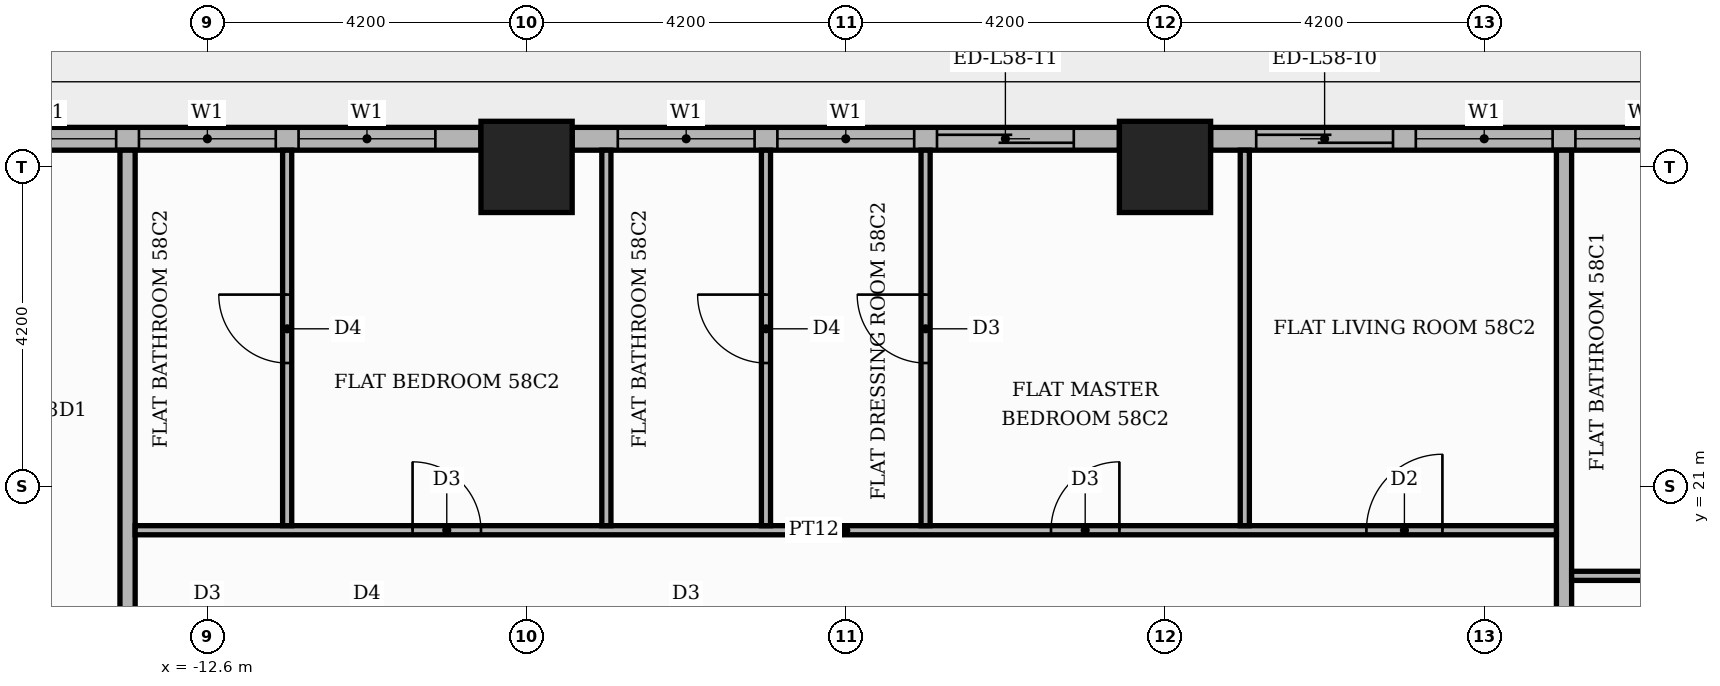
"""IFC4 building model, lengths in metres.
Left out: names, types, materials, properties, quantities, classifications, styles, units other than length and angle.
Written with IfcOpenShell. Run it as: python <this file> out.ifc"""

import sys

from ifc_helpers import new_model, si_unit, direction, frame, frame_2d, origin, origin_2d, place, context, subcontext, project, spatial, rectangle, extrude, element, fill, save


model = new_model("IFC4")
c1 = context("Model", 3, precision=1e-05, world=origin(), true_north=direction((0.0, 1.0)))
c2 = subcontext(c1, "Body", "Model", "MODEL_VIEW")
j1 = project(units=[si_unit("LENGTHUNIT", "METRE"), si_unit("PLANEANGLEUNIT", "RADIAN")], contexts=[c1])
p1 = place(None, origin())
s1 = spatial("IfcSite", under=j1, at=p1, CompositionType="ELEMENT")
p2 = place(p1, origin())
s2 = spatial("IfcBuilding", under=s1, at=p2, CompositionType="ELEMENT")
p3 = place(p2, frame((0.0, 0.0, 244.5)))
s3 = spatial("IfcBuildingStorey", under=s2, at=p3, CompositionType="ELEMENT", Elevation=244.5)
for number, where, z_axis, x_axis in (
    (1, (0.0, 25.2, 0.0), (0.0, 0.0, 1.0), (1.0, 0.0, 0.0)),
    (2, (-8.4, 25.2, 0.0), (0.0, 0.0, 1.0), (1.0, 0.0, 0.0)),
):
    element("IfcColumn", number, at=place(p3, frame(where, z_axis=z_axis, x_axis=x_axis)), inside=s3, PredefinedType="COLUMN", context=c2, shape_type="SweptSolid", body=[
        extrude(rectangle(XDim=1.2, YDim=1.2, at=origin_2d()), origin(), (0.0, 0.0, 1.0), 3.9),
    ])
p4 = place(p3, frame((7.8, 25.57, 0.0), z_axis=(0.0, 0.0, 1.0), x_axis=(-1.0, 0.0, 0.0)))
e3 = element("IfcWall", 3, at=p4, inside=s3, PredefinedType="STANDARD", context=c2, shape_type="SweptSolid", body=[
    extrude(rectangle(XDim=7.2, YDim=0.3, at=frame_2d((3.6, 0.0))), origin(), (0.0, 0.0, 1.0), 3.48),
])
p5 = place(p4, frame((0.6, 0.0, 0.9)))
e4 = element("IfcOpeningElement", 4, at=p5, cuts=e3, PredefinedType="OPENING", context=c2, shape_type="SweptSolid", body=[
    extrude(rectangle(XDim=1.8, YDim=2.1, at=frame_2d((0.9, 1.05))), frame((0.0, 0.16, 0.0), z_axis=(0.0, -1.0, 0.0), x_axis=(1.0, 0.0, 0.0)), (0.0, 0.0, 1.0), 0.32),
])
p6 = place(p4, frame((2.7, 0.0, 0.9)))
e5 = element("IfcOpeningElement", 5, at=p6, cuts=e3, PredefinedType="OPENING", context=c2, shape_type="SweptSolid", body=[
    extrude(rectangle(XDim=1.8, YDim=2.1, at=frame_2d((0.9, 1.05))), frame((0.0, 0.16, 0.0), z_axis=(0.0, -1.0, 0.0), x_axis=(1.0, 0.0, 0.0)), (0.0, 0.0, 1.0), 0.32),
])
p7 = place(p4, frame((4.8, 0.0, 0.0)))
e6 = element("IfcOpeningElement", 6, at=p7, cuts=e3, PredefinedType="OPENING", context=c2, shape_type="SweptSolid", body=[
    extrude(rectangle(XDim=1.8, YDim=2.4, at=frame_2d((0.9, 1.2))), frame((0.0, 0.16, 0.0), z_axis=(0.0, -1.0, 0.0), x_axis=(1.0, 0.0, 0.0)), (0.0, 0.0, 1.0), 0.32),
])
p8 = place(p3, frame((-0.6, 25.57, 0.0), z_axis=(0.0, 0.0, 1.0), x_axis=(-1.0, 0.0, 0.0)))
e7 = element("IfcWall", 7, at=p8, inside=s3, PredefinedType="STANDARD", context=c2, shape_type="SweptSolid", body=[
    extrude(rectangle(XDim=7.2, YDim=0.3, at=frame_2d((3.6, 0.0))), origin(), (0.0, 0.0, 1.0), 3.48),
])
p9 = place(p8, frame((0.6, 0.0, 0.0)))
e8 = element("IfcOpeningElement", 8, at=p9, cuts=e7, PredefinedType="OPENING", context=c2, shape_type="SweptSolid", body=[
    extrude(rectangle(XDim=1.8, YDim=2.4, at=frame_2d((0.9, 1.2))), frame((0.0, 0.16, 0.0), z_axis=(0.0, -1.0, 0.0), x_axis=(1.0, 0.0, 0.0)), (0.0, 0.0, 1.0), 0.32),
])
p10 = place(p8, frame((2.7, 0.0, 0.9)))
e9 = element("IfcOpeningElement", 9, at=p10, cuts=e7, PredefinedType="OPENING", context=c2, shape_type="SweptSolid", body=[
    extrude(rectangle(XDim=1.8, YDim=2.1, at=frame_2d((0.9, 1.05))), frame((0.0, 0.16, 0.0), z_axis=(0.0, -1.0, 0.0), x_axis=(1.0, 0.0, 0.0)), (0.0, 0.0, 1.0), 0.32),
])
p11 = place(p8, frame((4.8, 0.0, 0.9)))
e10 = element("IfcOpeningElement", 10, at=p11, cuts=e7, PredefinedType="OPENING", context=c2, shape_type="SweptSolid", body=[
    extrude(rectangle(XDim=1.8, YDim=2.1, at=frame_2d((0.9, 1.05))), frame((0.0, 0.16, 0.0), z_axis=(0.0, -1.0, 0.0), x_axis=(1.0, 0.0, 0.0)), (0.0, 0.0, 1.0), 0.32),
])
p12 = place(p3, frame((-9.0, 25.57, 0.0), z_axis=(0.0, 0.0, 1.0), x_axis=(-1.0, 0.0, 0.0)))
e11 = element("IfcWall", 11, at=p12, inside=s3, PredefinedType="STANDARD", context=c2, shape_type="SweptSolid", body=[
    extrude(rectangle(XDim=7.2, YDim=0.3, at=frame_2d((3.6, 0.0))), origin(), (0.0, 0.0, 1.0), 3.48),
])
p13 = place(p12, frame((0.6, 0.0, 0.9)))
e12 = element("IfcOpeningElement", 12, at=p13, cuts=e11, PredefinedType="OPENING", context=c2, shape_type="SweptSolid", body=[
    extrude(rectangle(XDim=1.8, YDim=2.1, at=frame_2d((0.9, 1.05))), frame((0.0, 0.16, 0.0), z_axis=(0.0, -1.0, 0.0), x_axis=(1.0, 0.0, 0.0)), (0.0, 0.0, 1.0), 0.32),
])
p14 = place(p12, frame((2.7, 0.0, 0.9)))
e13 = element("IfcOpeningElement", 13, at=p14, cuts=e11, PredefinedType="OPENING", context=c2, shape_type="SweptSolid", body=[
    extrude(rectangle(XDim=1.8, YDim=2.1, at=frame_2d((0.9, 1.05))), frame((0.0, 0.16, 0.0), z_axis=(0.0, -1.0, 0.0), x_axis=(1.0, 0.0, 0.0)), (0.0, 0.0, 1.0), 0.32),
])
p15 = place(p12, frame((4.8, 0.0, 0.9)))
e14 = element("IfcOpeningElement", 14, at=p15, cuts=e11, PredefinedType="OPENING", context=c2, shape_type="SweptSolid", body=[
    extrude(rectangle(XDim=1.8, YDim=2.1, at=frame_2d((0.9, 1.05))), frame((0.0, 0.16, 0.0), z_axis=(0.0, -1.0, 0.0), x_axis=(1.0, 0.0, 0.0)), (0.0, 0.0, 1.0), 0.32),
])
for number, where, z_axis, x_axis in (
    (15, (-13.65, 13.75, 0.0), (0.0, 0.0, 1.0), (0.0, 1.0, 0.0)),
    (16, (5.25, 13.75, 0.0), (0.0, 0.0, 1.0), (0.0, 1.0, 0.0)),
):
    element("IfcWall", number, at=place(p3, frame(where, z_axis=z_axis, x_axis=x_axis)), inside=s3, PredefinedType="PARTITIONING", context=c2, shape_type="SweptSolid", body=[
        extrude(rectangle(XDim=11.67, YDim=0.2, at=frame_2d((5.835, 0.0))), origin(), (0.0, 0.0, 1.0), 3.48),
    ])
p16 = place(p3, frame((5.35, 19.82, 0.0), z_axis=(0.0, 0.0, 1.0), x_axis=(1.0, 0.0, 0.0)))
e17 = element("IfcWall", 17, at=p16, inside=s3, PredefinedType="PARTITIONING", context=c2, shape_type="SweptSolid", body=[
    extrude(rectangle(XDim=12.35, YDim=0.12, at=frame_2d((6.175, 0.0))), origin(), (0.0, 0.0, 1.0), 3.48),
])
p17 = place(p16, frame((8.85, 0.0, 0.0)))
e18 = element("IfcOpeningElement", 18, at=p17, cuts=e17, PredefinedType="OPENING", context=c2, shape_type="SweptSolid", body=[
    extrude(rectangle(XDim=1.0, YDim=2.1, at=frame_2d((0.5, 1.05))), frame((0.0, 0.07, 0.0), z_axis=(0.0, -1.0, 0.0), x_axis=(1.0, 0.0, 0.0)), (0.0, 0.0, 1.0), 0.14),
])
p18 = place(p16, frame((5.75, 0.0, 0.0)))
e19 = element("IfcOpeningElement", 19, at=p18, cuts=e17, PredefinedType="OPENING", context=c2, shape_type="SweptSolid", body=[
    extrude(rectangle(XDim=0.9, YDim=2.1, at=frame_2d((0.45, 1.05))), frame((0.0, 0.07, 0.0), z_axis=(0.0, -1.0, 0.0), x_axis=(1.0, 0.0, 0.0)), (0.0, 0.0, 1.0), 0.14),
])
p19 = place(p3, frame((-13.55, 20.42, 0.0), z_axis=(0.0, 0.0, 1.0), x_axis=(1.0, 0.0, 0.0)))
e20 = element("IfcWall", 20, at=p19, inside=s3, PredefinedType="PARTITIONING", context=c2, shape_type="SweptSolid", body=[
    extrude(rectangle(XDim=18.7, YDim=0.12, at=frame_2d((9.35, 0.0))), origin(), (0.0, 0.0, 1.0), 3.48),
])
p20 = place(p19, frame((16.2, 0.0, 0.0)))
e21 = element("IfcOpeningElement", 21, at=p20, cuts=e20, PredefinedType="OPENING", context=c2, shape_type="SweptSolid", body=[
    extrude(rectangle(XDim=1.0, YDim=2.1, at=frame_2d((0.5, 1.05))), frame((0.0, 0.07, 0.0), z_axis=(0.0, -1.0, 0.0), x_axis=(1.0, 0.0, 0.0)), (0.0, 0.0, 1.0), 0.14),
])
p21 = place(p19, frame((12.05, 0.0, 0.0)))
e22 = element("IfcOpeningElement", 22, at=p21, cuts=e20, PredefinedType="OPENING", context=c2, shape_type="SweptSolid", body=[
    extrude(rectangle(XDim=0.9, YDim=2.1, at=frame_2d((0.45, 1.05))), frame((0.0, 0.07, 0.0), z_axis=(0.0, -1.0, 0.0), x_axis=(1.0, 0.0, 0.0)), (0.0, 0.0, 1.0), 0.14),
])
p22 = place(p19, frame((3.65, 0.0, 0.0)))
e23 = element("IfcOpeningElement", 23, at=p22, cuts=e20, PredefinedType="OPENING", context=c2, shape_type="SweptSolid", body=[
    extrude(rectangle(XDim=0.9, YDim=2.1, at=frame_2d((0.45, 1.05))), frame((0.0, 0.07, 0.0), z_axis=(0.0, -1.0, 0.0), x_axis=(1.0, 0.0, 0.0)), (0.0, 0.0, 1.0), 0.14),
])
p23 = place(p3, frame((-11.55, 20.48, 0.0), z_axis=(0.0, 0.0, 1.0), x_axis=(0.0, 1.0, 0.0)))
e24 = element("IfcWall", 24, at=p23, inside=s3, PredefinedType="PARTITIONING", context=c2, shape_type="SweptSolid", body=[
    extrude(rectangle(XDim=4.94, YDim=0.12, at=frame_2d((2.47, 0.0))), origin(), (0.0, 0.0, 1.0), 3.48),
])
p24 = place(p23, frame((2.14, 0.0, 0.0)))
e25 = element("IfcOpeningElement", 25, at=p24, cuts=e24, PredefinedType="OPENING", context=c2, shape_type="SweptSolid", body=[
    extrude(rectangle(XDim=0.9, YDim=2.1, at=frame_2d((0.45, 1.05))), frame((0.0, 0.07, 0.0), z_axis=(0.0, -1.0, 0.0), x_axis=(1.0, 0.0, 0.0)), (0.0, 0.0, 1.0), 0.14),
])
p25 = place(p3, frame((-7.35, 20.48, 0.0), z_axis=(0.0, 0.0, 1.0), x_axis=(0.0, 1.0, 0.0)))
e26 = element("IfcWall", 26, at=p25, inside=s3, PredefinedType="PARTITIONING", context=c2, shape_type="SweptSolid", body=[
    extrude(rectangle(XDim=4.94, YDim=0.12, at=frame_2d((2.47, 0.0))), origin(), (0.0, 0.0, 1.0), 3.48),
])
p26 = place(p3, frame((-5.25, 20.48, 0.0), z_axis=(0.0, 0.0, 1.0), x_axis=(0.0, 1.0, 0.0)))
e27 = element("IfcWall", 27, at=p26, inside=s3, PredefinedType="PARTITIONING", context=c2, shape_type="SweptSolid", body=[
    extrude(rectangle(XDim=4.94, YDim=0.12, at=frame_2d((2.47, 0.0))), origin(), (0.0, 0.0, 1.0), 3.48),
])
p27 = place(p26, frame((2.14, 0.0, 0.0)))
e28 = element("IfcOpeningElement", 28, at=p27, cuts=e27, PredefinedType="OPENING", context=c2, shape_type="SweptSolid", body=[
    extrude(rectangle(XDim=0.9, YDim=2.1, at=frame_2d((0.45, 1.05))), frame((0.0, 0.07, 0.0), z_axis=(0.0, -1.0, 0.0), x_axis=(1.0, 0.0, 0.0)), (0.0, 0.0, 1.0), 0.14),
])
p28 = place(p3, frame((-3.15, 20.48, 0.0), z_axis=(0.0, 0.0, 1.0), x_axis=(0.0, 1.0, 0.0)))
e29 = element("IfcWall", 29, at=p28, inside=s3, PredefinedType="PARTITIONING", context=c2, shape_type="SweptSolid", body=[
    extrude(rectangle(XDim=4.94, YDim=0.12, at=frame_2d((2.47, 0.0))), origin(), (0.0, 0.0, 1.0), 3.48),
])
p29 = place(p28, frame((2.14, 0.0, 0.0)))
e30 = element("IfcOpeningElement", 30, at=p29, cuts=e29, PredefinedType="OPENING", context=c2, shape_type="SweptSolid", body=[
    extrude(rectangle(XDim=0.9, YDim=2.1, at=frame_2d((0.45, 1.05))), frame((0.0, 0.07, 0.0), z_axis=(0.0, -1.0, 0.0), x_axis=(1.0, 0.0, 0.0)), (0.0, 0.0, 1.0), 0.14),
])
p30 = place(p3, frame((1.05, 20.48, 0.0), z_axis=(0.0, 0.0, 1.0), x_axis=(0.0, 1.0, 0.0)))
e31 = element("IfcWall", 31, at=p30, inside=s3, PredefinedType="PARTITIONING", context=c2, shape_type="SweptSolid", body=[
    extrude(rectangle(XDim=4.94, YDim=0.12, at=frame_2d((2.47, 0.0))), origin(), (0.0, 0.0, 1.0), 3.48),
])
p31 = place(p5, origin())
e32 = element("IfcWindow", 32, at=p31, inside=s3, PartitioningType="SINGLE_PANEL", PredefinedType="WINDOW", context=c2, shape_type="SweptSolid", body=[
    extrude(rectangle(XDim=1.8, YDim=2.1, at=frame_2d((0.9, 1.05))), frame((0.0, 0.03, 0.0), z_axis=(0.0, -1.0, 0.0), x_axis=(1.0, 0.0, 0.0)), (0.0, 0.0, 1.0), 0.06),
])
fill(e4, e32)
p32 = place(p6, origin())
e33 = element("IfcWindow", 33, at=p32, inside=s3, PartitioningType="SINGLE_PANEL", PredefinedType="WINDOW", context=c2, shape_type="SweptSolid", body=[
    extrude(rectangle(XDim=1.8, YDim=2.1, at=frame_2d((0.9, 1.05))), frame((0.0, 0.03, 0.0), z_axis=(0.0, -1.0, 0.0), x_axis=(1.0, 0.0, 0.0)), (0.0, 0.0, 1.0), 0.06),
])
fill(e5, e33)
p33 = place(p7, origin())
e34 = element("IfcDoor", 34, at=p33, inside=s3, OperationType="SLIDING_TO_RIGHT", PredefinedType="DOOR", context=c2, shape_type="SweptSolid", body=[
    extrude(rectangle(XDim=1.8, YDim=2.4, at=frame_2d((0.9, 1.2))), frame((0.0, 0.025, 0.0), z_axis=(0.0, -1.0, 0.0), x_axis=(1.0, 0.0, 0.0)), (0.0, 0.0, 1.0), 0.05),
])
fill(e6, e34)
p34 = place(p9, origin())
e35 = element("IfcDoor", 35, at=p34, inside=s3, OperationType="SLIDING_TO_LEFT", PredefinedType="DOOR", context=c2, shape_type="SweptSolid", body=[
    extrude(rectangle(XDim=1.8, YDim=2.4, at=frame_2d((0.9, 1.2))), frame((0.0, 0.025, 0.0), z_axis=(0.0, -1.0, 0.0), x_axis=(1.0, 0.0, 0.0)), (0.0, 0.0, 1.0), 0.05),
])
fill(e8, e35)
p35 = place(p10, origin())
e36 = element("IfcWindow", 36, at=p35, inside=s3, PartitioningType="SINGLE_PANEL", PredefinedType="WINDOW", context=c2, shape_type="SweptSolid", body=[
    extrude(rectangle(XDim=1.8, YDim=2.1, at=frame_2d((0.9, 1.05))), frame((0.0, 0.03, 0.0), z_axis=(0.0, -1.0, 0.0), x_axis=(1.0, 0.0, 0.0)), (0.0, 0.0, 1.0), 0.06),
])
fill(e9, e36)
p36 = place(p11, origin())
e37 = element("IfcWindow", 37, at=p36, inside=s3, PartitioningType="SINGLE_PANEL", PredefinedType="WINDOW", context=c2, shape_type="SweptSolid", body=[
    extrude(rectangle(XDim=1.8, YDim=2.1, at=frame_2d((0.9, 1.05))), frame((0.0, 0.03, 0.0), z_axis=(0.0, -1.0, 0.0), x_axis=(1.0, 0.0, 0.0)), (0.0, 0.0, 1.0), 0.06),
])
fill(e10, e37)
p37 = place(p13, origin())
e38 = element("IfcWindow", 38, at=p37, inside=s3, PartitioningType="SINGLE_PANEL", PredefinedType="WINDOW", context=c2, shape_type="SweptSolid", body=[
    extrude(rectangle(XDim=1.8, YDim=2.1, at=frame_2d((0.9, 1.05))), frame((0.0, 0.03, 0.0), z_axis=(0.0, -1.0, 0.0), x_axis=(1.0, 0.0, 0.0)), (0.0, 0.0, 1.0), 0.06),
])
fill(e12, e38)
p38 = place(p14, origin())
e39 = element("IfcWindow", 39, at=p38, inside=s3, PartitioningType="SINGLE_PANEL", PredefinedType="WINDOW", context=c2, shape_type="SweptSolid", body=[
    extrude(rectangle(XDim=1.8, YDim=2.1, at=frame_2d((0.9, 1.05))), frame((0.0, 0.03, 0.0), z_axis=(0.0, -1.0, 0.0), x_axis=(1.0, 0.0, 0.0)), (0.0, 0.0, 1.0), 0.06),
])
fill(e13, e39)
p39 = place(p15, origin())
e40 = element("IfcWindow", 40, at=p39, inside=s3, PartitioningType="SINGLE_PANEL", PredefinedType="WINDOW", context=c2, shape_type="SweptSolid", body=[
    extrude(rectangle(XDim=1.8, YDim=2.1, at=frame_2d((0.9, 1.05))), frame((0.0, 0.03, 0.0), z_axis=(0.0, -1.0, 0.0), x_axis=(1.0, 0.0, 0.0)), (0.0, 0.0, 1.0), 0.06),
])
fill(e14, e40)
p40 = place(p20, origin())
e41 = element("IfcDoor", 41, at=p40, inside=s3, OperationType="SINGLE_SWING_RIGHT", PredefinedType="DOOR", context=c2, shape_type="SweptSolid", body=[
    extrude(rectangle(XDim=1.0, YDim=2.1, at=frame_2d((0.5, 1.05))), frame((0.0, 0.025, 0.0), z_axis=(0.0, -1.0, 0.0), x_axis=(1.0, 0.0, 0.0)), (0.0, 0.0, 1.0), 0.05),
])
fill(e21, e41)
p41 = place(p21, origin())
e42 = element("IfcDoor", 42, at=p41, inside=s3, OperationType="SINGLE_SWING_RIGHT", PredefinedType="DOOR", context=c2, shape_type="SweptSolid", body=[
    extrude(rectangle(XDim=0.9, YDim=2.1, at=frame_2d((0.45, 1.05))), frame((0.0, 0.025, 0.0), z_axis=(0.0, -1.0, 0.0), x_axis=(1.0, 0.0, 0.0)), (0.0, 0.0, 1.0), 0.05),
])
fill(e22, e42)
p42 = place(p29, origin())
e43 = element("IfcDoor", 43, at=p42, inside=s3, OperationType="SINGLE_SWING_RIGHT", PredefinedType="DOOR", context=c2, shape_type="SweptSolid", body=[
    extrude(rectangle(XDim=0.9, YDim=2.1, at=frame_2d((0.45, 1.05))), frame((0.0, 0.025, 0.0), z_axis=(0.0, -1.0, 0.0), x_axis=(1.0, 0.0, 0.0)), (0.0, 0.0, 1.0), 0.05),
])
fill(e30, e43)
p43 = place(p27, origin())
e44 = element("IfcDoor", 44, at=p43, inside=s3, OperationType="SINGLE_SWING_RIGHT", PredefinedType="DOOR", context=c2, shape_type="SweptSolid", body=[
    extrude(rectangle(XDim=0.9, YDim=2.1, at=frame_2d((0.45, 1.05))), frame((0.0, 0.025, 0.0), z_axis=(0.0, -1.0, 0.0), x_axis=(1.0, 0.0, 0.0)), (0.0, 0.0, 1.0), 0.05),
])
fill(e28, e44)
p44 = place(p22, origin())
e45 = element("IfcDoor", 45, at=p44, inside=s3, OperationType="SINGLE_SWING_LEFT", PredefinedType="DOOR", context=c2, shape_type="SweptSolid", body=[
    extrude(rectangle(XDim=0.9, YDim=2.1, at=frame_2d((0.45, 1.05))), frame((0.0, 0.025, 0.0), z_axis=(0.0, -1.0, 0.0), x_axis=(1.0, 0.0, 0.0)), (0.0, 0.0, 1.0), 0.05),
])
fill(e23, e45)
p45 = place(p24, origin())
e46 = element("IfcDoor", 46, at=p45, inside=s3, OperationType="SINGLE_SWING_RIGHT", PredefinedType="DOOR", context=c2, shape_type="SweptSolid", body=[
    extrude(rectangle(XDim=0.9, YDim=2.1, at=frame_2d((0.45, 1.05))), frame((0.0, 0.025, 0.0), z_axis=(0.0, -1.0, 0.0), x_axis=(1.0, 0.0, 0.0)), (0.0, 0.0, 1.0), 0.05),
])
fill(e25, e46)
save(model, sys.argv[1])
